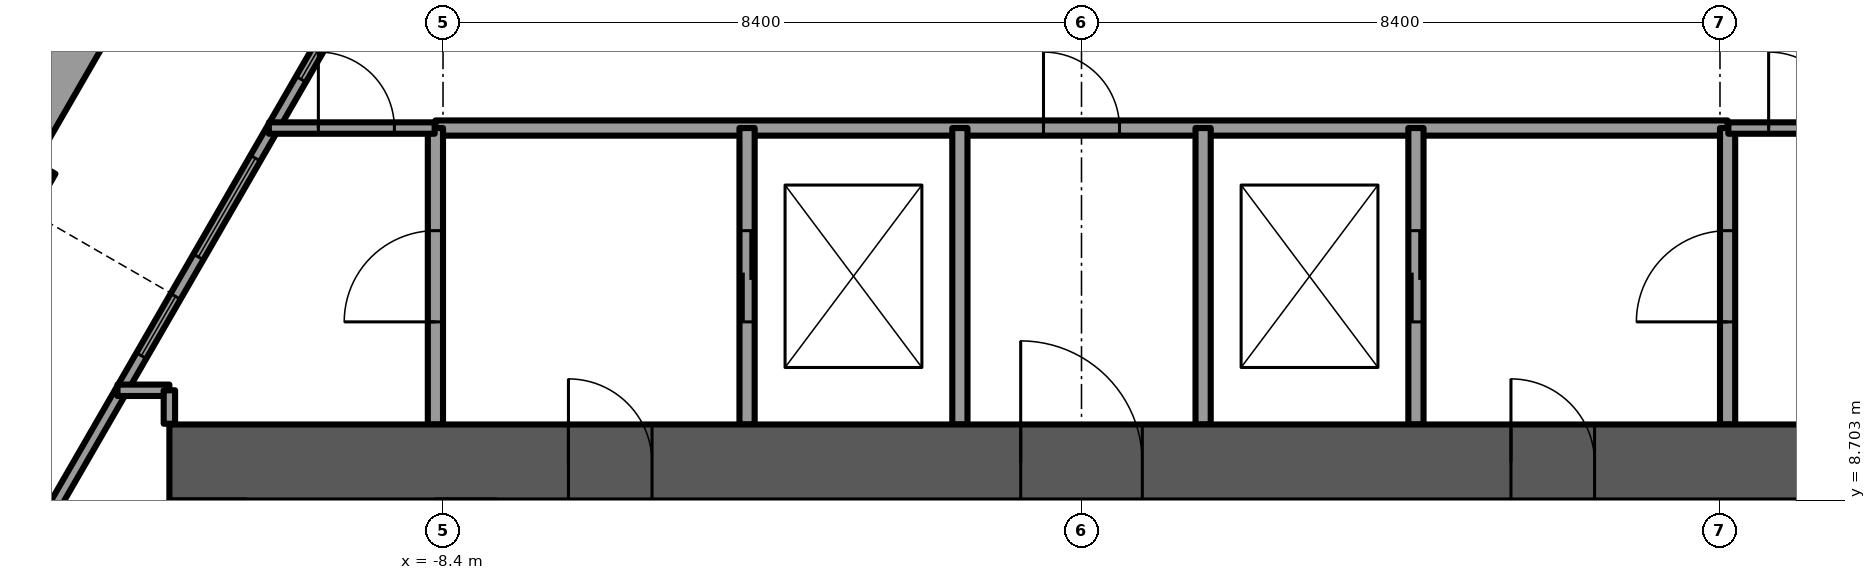
"""IFC4 building model, lengths in metres.
Left out: names, types, materials, properties, quantities, classifications, styles, units other than length and angle.
Written with IfcOpenShell. Run it as: python <this file> out.ifc"""

import sys

from ifc_helpers import new_model, si_unit, direction, frame, frame_2d, origin, origin_2d, place, context, subcontext, project, spatial, rectangle, extrude, element, fill, save


model = new_model("IFC4")
c1 = context("Model", 3, precision=1e-05, world=origin(), true_north=direction((0.0, 1.0)))
c2 = subcontext(c1, "Body", "Model", "MODEL_VIEW")
j1 = project(units=[si_unit("LENGTHUNIT", "METRE"), si_unit("PLANEANGLEUNIT", "RADIAN")], contexts=[c1])
p1 = place(None, origin())
s1 = spatial("IfcSite", under=j1, at=p1, CompositionType="ELEMENT")
p2 = place(p1, origin())
s2 = spatial("IfcBuilding", under=s1, at=p2, CompositionType="ELEMENT")
p3 = place(p2, frame((0.0, 0.0, 127.25)))
s3 = spatial("IfcBuildingStorey", under=s2, at=p3, CompositionType="ELEMENT", Elevation=127.25)
p4 = place(p3, frame((-14.318, 12.778, -1.2), z_axis=(0.0, 0.0, 1.0), x_axis=(0.5, 0.866025403784, 0.0)))
e1 = element("IfcColumn", 1, at=p4, inside=s3, PredefinedType="COLUMN", context=c2, shape_type="SweptSolid", body=[
    extrude(rectangle(XDim=1.2, YDim=1.2, at=origin_2d()), origin(), (0.0, 0.0, 1.0), 3.75),
])
p5 = place(p3, frame((-12.0, 9.2, -0.3), z_axis=(0.0, 0.0, 1.0), x_axis=(1.0, 0.0, 0.0)))
e2 = element("IfcWall", 2, at=p5, inside=s3, PredefinedType="SHEAR", context=c2, shape_type="SweptSolid", body=[
    extrude(rectangle(XDim=24.0, YDim=1.0, at=frame_2d((12.0, 0.0))), origin(), (0.0, 0.0, 1.0), 3.75),
])
p6 = place(p5, frame((11.2, 0.0, 0.0)))
e3 = element("IfcOpeningElement", 3, at=p6, cuts=e2, PredefinedType="OPENING", context=c2, shape_type="SweptSolid", body=[
    extrude(rectangle(XDim=1.6, YDim=2.1, at=frame_2d((0.8, 1.05))), frame((0.0, 0.5, 0.0), z_axis=(0.0, -1.0, 0.0), x_axis=(1.0, 0.0, 0.0)), (0.0, 0.0, 1.0), 1.0),
])
p7 = place(p5, frame((5.25, 0.0, 0.0)))
e4 = element("IfcOpeningElement", 4, at=p7, cuts=e2, PredefinedType="OPENING", context=c2, shape_type="SweptSolid", body=[
    extrude(rectangle(XDim=1.1, YDim=2.1, at=frame_2d((0.55, 1.05))), frame((0.0, 0.5, 0.0), z_axis=(0.0, -1.0, 0.0), x_axis=(1.0, 0.0, 0.0)), (0.0, 0.0, 1.0), 1.0),
])
p8 = place(p5, frame((17.65, 0.0, 0.0)))
e5 = element("IfcOpeningElement", 5, at=p8, cuts=e2, PredefinedType="OPENING", context=c2, shape_type="SweptSolid", body=[
    extrude(rectangle(XDim=1.1, YDim=2.1, at=frame_2d((0.55, 1.05))), frame((0.0, 0.5, 0.0), z_axis=(0.0, -1.0, 0.0), x_axis=(1.0, 0.0, 0.0)), (0.0, 0.0, 1.0), 1.0),
])
p9 = place(p3, frame((-10.734, 19.286, 0.0), z_axis=(0.0, 0.0, 1.0), x_axis=(-0.500001814021, -0.866024356456, 0.0)))
e6 = element("IfcWall", 6, at=p9, inside=s3, PredefinedType="PARAPET", context=c2, shape_type="SweptSolid", body=[
    extrude(rectangle(XDim=6.859, YDim=0.9, at=frame_2d((3.429, 0.0))), origin(), (0.0, 0.0, 1.0), 1.1),
])
p10 = place(p3, frame((-7.642, 18.792, 0.0), z_axis=(0.0, 0.0, 1.0), x_axis=(-0.500001219746, -0.866024699562, 0.0)))
e7 = element("IfcWall", 7, at=p10, inside=s3, PredefinedType="SOLIDWALL", context=c2, shape_type="SweptSolid", body=[
    extrude(rectangle(XDim=22.137, YDim=0.15, at=frame_2d((11.068, 0.0))), origin(), (0.0, 0.0, 1.0), 3.45),
])
p11 = place(p10, frame((4.354, 0.0, 0.15)))
e8 = element("IfcOpeningElement", 8, at=p11, cuts=e7, PredefinedType="OPENING", context=c2, shape_type="SweptSolid", body=[
    extrude(rectangle(XDim=0.9, YDim=2.85, at=frame_2d((0.45, 1.425))), frame((0.0, 0.075, 0.0), z_axis=(0.0, -1.0, 0.0), x_axis=(1.0, 0.0, 0.0)), (0.0, 0.0, 1.0), 0.15),
])
p12 = place(p10, frame((6.454, 0.0, 0.15)))
e9 = element("IfcOpeningElement", 9, at=p12, cuts=e7, PredefinedType="OPENING", context=c2, shape_type="SweptSolid", body=[
    extrude(rectangle(XDim=1.5, YDim=2.85, at=frame_2d((0.75, 1.425))), frame((0.0, 0.075, 0.0), z_axis=(0.0, -1.0, 0.0), x_axis=(1.0, 0.0, 0.0)), (0.0, 0.0, 1.0), 0.15),
])
p13 = place(p10, frame((8.554, 0.0, 0.15)))
e10 = element("IfcOpeningElement", 10, at=p13, cuts=e7, PredefinedType="OPENING", context=c2, shape_type="SweptSolid", body=[
    extrude(rectangle(XDim=0.9, YDim=2.85, at=frame_2d((0.45, 1.425))), frame((0.0, 0.075, 0.0), z_axis=(0.0, -1.0, 0.0), x_axis=(1.0, 0.0, 0.0)), (0.0, 0.0, 1.0), 0.15),
])
p14 = place(p10, frame((12.754, 0.0, 0.15)))
e11 = element("IfcOpeningElement", 11, at=p14, cuts=e7, PredefinedType="OPENING", context=c2, shape_type="SweptSolid", body=[
    extrude(rectangle(XDim=0.9, YDim=2.85, at=frame_2d((0.45, 1.425))), frame((0.0, 0.075, 0.0), z_axis=(0.0, -1.0, 0.0), x_axis=(1.0, 0.0, 0.0)), (0.0, 0.0, 1.0), 0.15),
])
p15 = place(p10, frame((14.449, 0.0, 0.15)))
e12 = element("IfcOpeningElement", 12, at=p15, cuts=e7, PredefinedType="OPENING", context=c2, shape_type="SweptSolid", body=[
    extrude(rectangle(XDim=1.5, YDim=2.85, at=frame_2d((0.75, 1.425))), frame((0.0, 0.075, 0.0), z_axis=(0.0, -1.0, 0.0), x_axis=(1.0, 0.0, 0.0)), (0.0, 0.0, 1.0), 0.15),
])
p16 = place(p10, frame((16.954, 0.0, 0.15)))
e13 = element("IfcOpeningElement", 13, at=p16, cuts=e7, PredefinedType="OPENING", context=c2, shape_type="SweptSolid", body=[
    extrude(rectangle(XDim=1.7, YDim=2.85, at=frame_2d((0.85, 1.425))), frame((0.0, 0.075, 0.0), z_axis=(0.0, -1.0, 0.0), x_axis=(1.0, 0.0, 0.0)), (0.0, 0.0, 1.0), 0.15),
])
p17 = place(p10, frame((19.054, 0.0, 0.0)))
e14 = element("IfcOpeningElement", 14, at=p17, cuts=e7, PredefinedType="OPENING", context=c2, shape_type="SweptSolid", body=[
    extrude(rectangle(XDim=1.5, YDim=2.4, at=frame_2d((0.75, 1.2))), frame((0.0, 0.075, 0.0), z_axis=(0.0, -1.0, 0.0), x_axis=(1.0, 0.0, 0.0)), (0.0, 0.0, 1.0), 0.15),
])
p18 = place(p10, frame((1.021, 0.0, 0.15)))
e15 = element("IfcOpeningElement", 15, at=p18, cuts=e7, PredefinedType="OPENING", context=c2, shape_type="SweptSolid", body=[
    extrude(rectangle(XDim=1.7, YDim=2.73, at=frame_2d((0.85, 1.365))), frame((0.0, 0.075, 0.0), z_axis=(0.0, -1.0, 0.0), x_axis=(1.0, 0.0, 0.0)), (0.0, 0.0, 1.0), 0.15),
])
p19 = place(p3, frame((18.71, -0.378, 0.0), z_axis=(0.0, 0.0, 1.0), x_axis=(-0.500001219746, 0.866024699562, 0.0)))
e16 = element("IfcWall", 16, at=p19, inside=s3, PredefinedType="SOLIDWALL", context=c2, shape_type="SweptSolid", body=[
    extrude(rectangle(XDim=22.137, YDim=0.15, at=frame_2d((11.068, 0.0))), origin(), (0.0, 0.0, 1.0), 3.45),
])
p20 = place(p19, frame((1.583, 0.0, 0.15)))
e17 = element("IfcOpeningElement", 17, at=p20, cuts=e16, PredefinedType="OPENING", context=c2, shape_type="SweptSolid", body=[
    extrude(rectangle(XDim=1.7, YDim=2.85, at=frame_2d((0.85, 1.425))), frame((0.0, 0.075, 0.0), z_axis=(0.0, -1.0, 0.0), x_axis=(1.0, 0.0, 0.0)), (0.0, 0.0, 1.0), 0.15),
])
p21 = place(p19, frame((3.438, 0.0, 0.0)))
e18 = element("IfcOpeningElement", 18, at=p21, cuts=e16, PredefinedType="OPENING", context=c2, shape_type="SweptSolid", body=[
    extrude(rectangle(XDim=1.5, YDim=2.4, at=frame_2d((0.75, 1.2))), frame((0.0, 0.075, 0.0), z_axis=(0.0, -1.0, 0.0), x_axis=(1.0, 0.0, 0.0)), (0.0, 0.0, 1.0), 0.15),
])
p22 = place(p19, frame((6.188, 0.0, 0.15)))
e19 = element("IfcOpeningElement", 19, at=p22, cuts=e16, PredefinedType="OPENING", context=c2, shape_type="SweptSolid", body=[
    extrude(rectangle(XDim=0.9, YDim=2.85, at=frame_2d((0.45, 1.425))), frame((0.0, 0.075, 0.0), z_axis=(0.0, -1.0, 0.0), x_axis=(1.0, 0.0, 0.0)), (0.0, 0.0, 1.0), 0.15),
])
p23 = place(p19, frame((7.883, 0.0, 0.15)))
e20 = element("IfcOpeningElement", 20, at=p23, cuts=e16, PredefinedType="OPENING", context=c2, shape_type="SweptSolid", body=[
    extrude(rectangle(XDim=1.5, YDim=2.85, at=frame_2d((0.75, 1.425))), frame((0.0, 0.075, 0.0), z_axis=(0.0, -1.0, 0.0), x_axis=(1.0, 0.0, 0.0)), (0.0, 0.0, 1.0), 0.15),
])
p24 = place(p19, frame((12.481, 0.0, 0.15)))
e21 = element("IfcOpeningElement", 21, at=p24, cuts=e16, PredefinedType="OPENING", context=c2, shape_type="SweptSolid", body=[
    extrude(rectangle(XDim=0.9, YDim=2.85, at=frame_2d((0.45, 1.425))), frame((0.0, 0.075, 0.0), z_axis=(0.0, -1.0, 0.0), x_axis=(1.0, 0.0, 0.0)), (0.0, 0.0, 1.0), 0.15),
])
p25 = place(p19, frame((10.281, 0.0, 0.15)))
e22 = element("IfcOpeningElement", 22, at=p25, cuts=e16, PredefinedType="OPENING", context=c2, shape_type="SweptSolid", body=[
    extrude(rectangle(XDim=1.5, YDim=2.85, at=frame_2d((0.75, 1.425))), frame((0.0, 0.075, 0.0), z_axis=(0.0, -1.0, 0.0), x_axis=(1.0, 0.0, 0.0)), (0.0, 0.0, 1.0), 0.15),
])
p26 = place(p19, frame((16.465, 0.0, 0.15)))
e23 = element("IfcOpeningElement", 23, at=p26, cuts=e16, PredefinedType="OPENING", context=c2, shape_type="SweptSolid", body=[
    extrude(rectangle(XDim=0.9, YDim=2.85, at=frame_2d((0.45, 1.425))), frame((0.0, 0.075, 0.0), z_axis=(0.0, -1.0, 0.0), x_axis=(1.0, 0.0, 0.0)), (0.0, 0.0, 1.0), 0.15),
])
p27 = place(p19, frame((14.265, 0.0, 0.15)))
e24 = element("IfcOpeningElement", 24, at=p27, cuts=e16, PredefinedType="OPENING", context=c2, shape_type="SweptSolid", body=[
    extrude(rectangle(XDim=1.5, YDim=2.85, at=frame_2d((0.75, 1.425))), frame((0.0, 0.075, 0.0), z_axis=(0.0, -1.0, 0.0), x_axis=(1.0, 0.0, 0.0)), (0.0, 0.0, 1.0), 0.15),
])
p28 = place(p19, frame((19.415, 0.0, 0.15)))
e25 = element("IfcOpeningElement", 25, at=p28, cuts=e16, PredefinedType="OPENING", context=c2, shape_type="SweptSolid", body=[
    extrude(rectangle(XDim=1.7, YDim=2.73, at=frame_2d((0.85, 1.365))), frame((0.0, 0.075, 0.0), z_axis=(0.0, -1.0, 0.0), x_axis=(1.0, 0.0, 0.0)), (0.0, 0.0, 1.0), 0.15),
])
p29 = place(p3, frame((-8.5, 13.6, 0.0), z_axis=(0.0, 0.0, 1.0), x_axis=(1.0, 0.0, 0.0)))
e26 = element("IfcWall", 26, at=p29, inside=s3, PredefinedType="PARTITIONING", context=c2, shape_type="SweptSolid", body=[
    extrude(rectangle(XDim=17.0, YDim=0.2, at=frame_2d((8.5, 0.0))), origin(), (0.0, 0.0, 1.0), 3.45),
])
p30 = place(p29, frame((8.0, 0.0, 0.0)))
e27 = element("IfcOpeningElement", 27, at=p30, cuts=e26, PredefinedType="OPENING", context=c2, shape_type="SweptSolid", body=[
    extrude(rectangle(XDim=1.0, YDim=2.1, at=frame_2d((0.5, 1.05))), frame((0.0, 0.1, 0.0), z_axis=(0.0, -1.0, 0.0), x_axis=(1.0, 0.0, 0.0)), (0.0, 0.0, 1.0), 0.2),
])
p31 = place(p3, frame((-8.5, 9.7, 0.0), z_axis=(0.0, 0.0, 1.0), x_axis=(0.0, 1.0, 0.0)))
e28 = element("IfcWall", 28, at=p31, inside=s3, PredefinedType="PARTITIONING", context=c2, shape_type="SweptSolid", body=[
    extrude(rectangle(XDim=3.9, YDim=0.2, at=frame_2d((1.95, 0.0))), origin(), (0.0, 0.0, 1.0), 3.45),
])
p32 = place(p31, frame((1.35, 0.0, 0.0)))
e29 = element("IfcOpeningElement", 29, at=p32, cuts=e28, PredefinedType="OPENING", context=c2, shape_type="SweptSolid", body=[
    extrude(rectangle(XDim=1.2, YDim=2.1, at=frame_2d((0.6, 1.05))), frame((0.0, 0.1, 0.0), z_axis=(0.0, -1.0, 0.0), x_axis=(1.0, 0.0, 0.0)), (0.0, 0.0, 1.0), 0.2),
])
p33 = place(p3, frame((8.5, 9.7, 0.0), z_axis=(0.0, 0.0, 1.0), x_axis=(0.0, 1.0, 0.0)))
e30 = element("IfcWall", 30, at=p33, inside=s3, PredefinedType="PARTITIONING", context=c2, shape_type="SweptSolid", body=[
    extrude(rectangle(XDim=3.9, YDim=0.2, at=frame_2d((1.95, 0.0))), origin(), (0.0, 0.0, 1.0), 3.45),
])
p34 = place(p33, frame((1.35, 0.0, 0.0)))
e31 = element("IfcOpeningElement", 31, at=p34, cuts=e30, PredefinedType="OPENING", context=c2, shape_type="SweptSolid", body=[
    extrude(rectangle(XDim=1.2, YDim=2.1, at=frame_2d((0.6, 1.05))), frame((0.0, 0.1, 0.0), z_axis=(0.0, -1.0, 0.0), x_axis=(1.0, 0.0, 0.0)), (0.0, 0.0, 1.0), 0.2),
])
p35 = place(p3, frame((-4.4, 9.7, 0.0), z_axis=(0.0, 0.0, 1.0), x_axis=(0.0, 1.0, 0.0)))
e32 = element("IfcWall", 32, at=p35, inside=s3, PredefinedType="PARTITIONING", context=c2, shape_type="SweptSolid", body=[
    extrude(rectangle(XDim=3.9, YDim=0.2, at=frame_2d((1.95, 0.0))), origin(), (0.0, 0.0, 1.0), 3.45),
])
p36 = place(p35, frame((1.35, 0.0, 0.0)))
e33 = element("IfcOpeningElement", 33, at=p36, cuts=e32, PredefinedType="OPENING", context=c2, shape_type="SweptSolid", body=[
    extrude(rectangle(XDim=1.2, YDim=2.1, at=frame_2d((0.6, 1.05))), frame((0.0, 0.1, 0.0), z_axis=(0.0, -1.0, 0.0), x_axis=(1.0, 0.0, 0.0)), (0.0, 0.0, 1.0), 0.2),
])
p37 = place(p3, frame((4.4, 9.7, 0.0), z_axis=(0.0, 0.0, 1.0), x_axis=(0.0, 1.0, 0.0)))
e34 = element("IfcWall", 34, at=p37, inside=s3, PredefinedType="PARTITIONING", context=c2, shape_type="SweptSolid", body=[
    extrude(rectangle(XDim=3.9, YDim=0.2, at=frame_2d((1.95, 0.0))), origin(), (0.0, 0.0, 1.0), 3.45),
])
p38 = place(p37, frame((1.35, 0.0, 0.0)))
e35 = element("IfcOpeningElement", 35, at=p38, cuts=e34, PredefinedType="OPENING", context=c2, shape_type="SweptSolid", body=[
    extrude(rectangle(XDim=1.2, YDim=2.1, at=frame_2d((0.6, 1.05))), frame((0.0, 0.1, 0.0), z_axis=(0.0, -1.0, 0.0), x_axis=(1.0, 0.0, 0.0)), (0.0, 0.0, 1.0), 0.2),
])
for number, where, z_axis, x_axis in (
    (36, (-1.6, 9.7, 0.0), (0.0, 0.0, 1.0), (0.0, 1.0, 0.0)),
    (37, (1.6, 9.7, 0.0), (0.0, 0.0, 1.0), (0.0, 1.0, 0.0)),
):
    element("IfcWall", number, at=place(p3, frame(where, z_axis=z_axis, x_axis=x_axis)), inside=s3, PredefinedType="PARTITIONING", context=c2, shape_type="SweptSolid", body=[
        extrude(rectangle(XDim=3.9, YDim=0.2, at=frame_2d((1.95, 0.0))), origin(), (0.0, 0.0, 1.0), 3.45),
    ])
p39 = place(p3, frame((-12.683, 10.15, 0.0), z_axis=(0.0, 0.0, 1.0), x_axis=(1.0, 0.0, 0.0)))
e38 = element("IfcWall", 38, at=p39, inside=s3, PredefinedType="PARTITIONING", context=c2, shape_type="SweptSolid", body=[
    extrude(rectangle(XDim=0.683, YDim=0.15, at=frame_2d((0.342, 0.0))), origin(), (0.0, 0.0, 1.0), 3.45),
])
p40 = place(p3, frame((-10.691, 13.6, 0.0), z_axis=(0.0, 0.0, 1.0), x_axis=(1.0, 0.0, 0.0)))
e39 = element("IfcWall", 39, at=p40, inside=s3, PredefinedType="PARTITIONING", context=c2, shape_type="SweptSolid", body=[
    extrude(rectangle(XDim=2.181, YDim=0.15, at=frame_2d((1.09, 0.0))), origin(), (0.0, 0.0, 1.0), 3.45),
])
p41 = place(p40, frame((0.651, 0.0, 0.0)))
e40 = element("IfcOpeningElement", 40, at=p41, cuts=e39, PredefinedType="OPENING", context=c2, shape_type="SweptSolid", body=[
    extrude(rectangle(XDim=1.0, YDim=2.1, at=frame_2d((0.5, 1.05))), frame((0.0, 0.075, 0.0), z_axis=(0.0, -1.0, 0.0), x_axis=(1.0, 0.0, 0.0)), (0.0, 0.0, 1.0), 0.15),
])
p42 = place(p3, frame((8.51, 13.6, 0.0), z_axis=(0.0, 0.0, 1.0), x_axis=(1.0, 0.0, 0.0)))
e41 = element("IfcWall", 41, at=p42, inside=s3, PredefinedType="PARTITIONING", context=c2, shape_type="SweptSolid", body=[
    extrude(rectangle(XDim=2.181, YDim=0.15, at=frame_2d((1.09, 0.0))), origin(), (0.0, 0.0, 1.0), 3.45),
])
p43 = place(p42, frame((0.53, 0.0, 0.0)))
e42 = element("IfcOpeningElement", 42, at=p43, cuts=e41, PredefinedType="OPENING", context=c2, shape_type="SweptSolid", body=[
    extrude(rectangle(XDim=1.0, YDim=2.1, at=frame_2d((0.5, 1.05))), frame((0.0, 0.075, 0.0), z_axis=(0.0, -1.0, 0.0), x_axis=(1.0, 0.0, 0.0)), (0.0, 0.0, 1.0), 0.15),
])
p44 = place(p3, frame((-12.0, 9.71, 0.0), z_axis=(0.0, 0.0, 1.0), x_axis=(0.0, 1.0, 0.0)))
e43 = element("IfcWall", 43, at=p44, inside=s3, PredefinedType="PARTITIONING", context=c2, shape_type="SweptSolid", body=[
    extrude(rectangle(XDim=0.44, YDim=0.15, at=frame_2d((0.22, 0.0))), origin(), (0.0, 0.0, 1.0), 3.45),
])
p45 = place(p11, origin())
e44 = element("IfcWindow", 44, at=p45, inside=s3, PartitioningType="SINGLE_PANEL", PredefinedType="WINDOW", context=c2, shape_type="SweptSolid", body=[
    extrude(rectangle(XDim=0.9, YDim=2.85, at=frame_2d((0.45, 1.425))), frame((0.0, 0.03, 0.0), z_axis=(0.0, -1.0, 0.0), x_axis=(1.0, 0.0, 0.0)), (0.0, 0.0, 1.0), 0.06),
])
fill(e8, e44)
p46 = place(p12, origin())
e45 = element("IfcWindow", 45, at=p46, inside=s3, PartitioningType="SINGLE_PANEL", PredefinedType="WINDOW", context=c2, shape_type="SweptSolid", body=[
    extrude(rectangle(XDim=1.5, YDim=2.85, at=frame_2d((0.75, 1.425))), frame((0.0, 0.03, 0.0), z_axis=(0.0, -1.0, 0.0), x_axis=(1.0, 0.0, 0.0)), (0.0, 0.0, 1.0), 0.06),
])
fill(e9, e45)
p47 = place(p13, origin())
e46 = element("IfcWindow", 46, at=p47, inside=s3, PartitioningType="SINGLE_PANEL", PredefinedType="WINDOW", context=c2, shape_type="SweptSolid", body=[
    extrude(rectangle(XDim=0.9, YDim=2.85, at=frame_2d((0.45, 1.425))), frame((0.0, 0.03, 0.0), z_axis=(0.0, -1.0, 0.0), x_axis=(1.0, 0.0, 0.0)), (0.0, 0.0, 1.0), 0.06),
])
fill(e10, e46)
p48 = place(p6, origin())
e47 = element("IfcDoor", 47, at=p48, inside=s3, OperationType="DOUBLE_DOOR_SINGLE_SWING", PredefinedType="DOOR", context=c2, shape_type="SweptSolid", body=[
    extrude(rectangle(XDim=1.6, YDim=2.1, at=frame_2d((0.8, 1.05))), frame((0.0, 0.025, 0.0), z_axis=(0.0, -1.0, 0.0), x_axis=(1.0, 0.0, 0.0)), (0.0, 0.0, 1.0), 0.05),
])
fill(e3, e47)
p49 = place(p7, origin())
e48 = element("IfcDoor", 48, at=p49, inside=s3, OperationType="SINGLE_SWING_LEFT", PredefinedType="DOOR", context=c2, shape_type="SweptSolid", body=[
    extrude(rectangle(XDim=1.1, YDim=2.1, at=frame_2d((0.55, 1.05))), frame((0.0, 0.025, 0.0), z_axis=(0.0, -1.0, 0.0), x_axis=(1.0, 0.0, 0.0)), (0.0, 0.0, 1.0), 0.05),
])
fill(e4, e48)
p50 = place(p8, origin())
e49 = element("IfcDoor", 49, at=p50, inside=s3, OperationType="SINGLE_SWING_RIGHT", PredefinedType="DOOR", context=c2, shape_type="SweptSolid", body=[
    extrude(rectangle(XDim=1.1, YDim=2.1, at=frame_2d((0.55, 1.05))), frame((0.0, 0.025, 0.0), z_axis=(0.0, -1.0, 0.0), x_axis=(1.0, 0.0, 0.0)), (0.0, 0.0, 1.0), 0.05),
])
fill(e5, e49)
p51 = place(p36, origin())
e50 = element("IfcDoor", 50, at=p51, inside=s3, OperationType="SLIDING_TO_LEFT", PredefinedType="DOOR", context=c2, shape_type="SweptSolid", body=[
    extrude(rectangle(XDim=1.2, YDim=2.1, at=frame_2d((0.6, 1.05))), frame((0.0, 0.025, 0.0), z_axis=(0.0, -1.0, 0.0), x_axis=(1.0, 0.0, 0.0)), (0.0, 0.0, 1.0), 0.05),
])
fill(e33, e50)
p52 = place(p32, origin())
e51 = element("IfcDoor", 51, at=p52, inside=s3, OperationType="SINGLE_SWING_LEFT", PredefinedType="DOOR", context=c2, shape_type="SweptSolid", body=[
    extrude(rectangle(XDim=1.2, YDim=2.1, at=frame_2d((0.6, 1.05))), frame((0.0, 0.025, 0.0), z_axis=(0.0, -1.0, 0.0), x_axis=(1.0, 0.0, 0.0)), (0.0, 0.0, 1.0), 0.05),
])
fill(e29, e51)
p53 = place(p38, origin())
e52 = element("IfcDoor", 52, at=p53, inside=s3, OperationType="SLIDING_TO_LEFT", PredefinedType="DOOR", context=c2, shape_type="SweptSolid", body=[
    extrude(rectangle(XDim=1.2, YDim=2.1, at=frame_2d((0.6, 1.05))), frame((0.0, 0.025, 0.0), z_axis=(0.0, -1.0, 0.0), x_axis=(1.0, 0.0, 0.0)), (0.0, 0.0, 1.0), 0.05),
])
fill(e35, e52)
p54 = place(p34, origin())
e53 = element("IfcDoor", 53, at=p54, inside=s3, OperationType="SINGLE_SWING_LEFT", PredefinedType="DOOR", context=c2, shape_type="SweptSolid", body=[
    extrude(rectangle(XDim=1.2, YDim=2.1, at=frame_2d((0.6, 1.05))), frame((0.0, 0.025, 0.0), z_axis=(0.0, -1.0, 0.0), x_axis=(1.0, 0.0, 0.0)), (0.0, 0.0, 1.0), 0.05),
])
fill(e31, e53)
p55 = place(p30, origin())
e54 = element("IfcDoor", 54, at=p55, inside=s3, OperationType="SINGLE_SWING_LEFT", PredefinedType="DOOR", context=c2, shape_type="SweptSolid", body=[
    extrude(rectangle(XDim=1.0, YDim=2.1, at=frame_2d((0.5, 1.05))), frame((0.0, 0.025, 0.0), z_axis=(0.0, -1.0, 0.0), x_axis=(1.0, 0.0, 0.0)), (0.0, 0.0, 1.0), 0.05),
])
fill(e27, e54)
p56 = place(p41, origin())
e55 = element("IfcDoor", 55, at=p56, inside=s3, OperationType="SINGLE_SWING_RIGHT", PredefinedType="DOOR", context=c2, shape_type="SweptSolid", body=[
    extrude(rectangle(XDim=1.0, YDim=2.1, at=frame_2d((0.5, 1.05))), frame((0.0, 0.025, 0.0), z_axis=(0.0, -1.0, 0.0), x_axis=(1.0, 0.0, 0.0)), (0.0, 0.0, 1.0), 0.05),
])
fill(e40, e55)
p57 = place(p43, origin())
e56 = element("IfcDoor", 56, at=p57, inside=s3, OperationType="SINGLE_SWING_LEFT", PredefinedType="DOOR", context=c2, shape_type="SweptSolid", body=[
    extrude(rectangle(XDim=1.0, YDim=2.1, at=frame_2d((0.5, 1.05))), frame((0.0, 0.025, 0.0), z_axis=(0.0, -1.0, 0.0), x_axis=(1.0, 0.0, 0.0)), (0.0, 0.0, 1.0), 0.05),
])
fill(e42, e56)
save(model, sys.argv[1])
